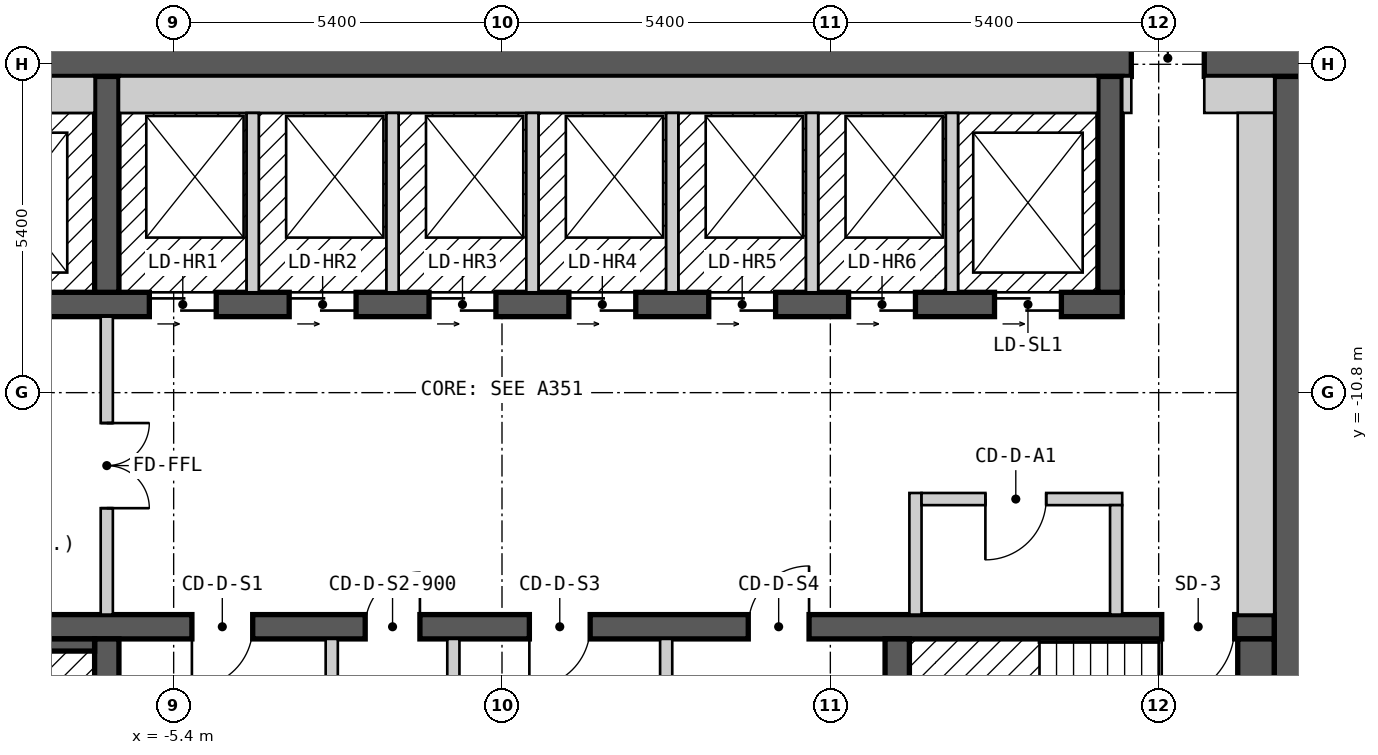
"""IFC4 building model, lengths in metres.
Left out: names, types, materials, properties, quantities, classifications, styles, units other than length and angle.
Written with IfcOpenShell. Run it as: python <this file> out.ifc"""

import sys

from ifc_helpers import new_model, si_unit, direction, frame, frame_2d, origin, place, context, subcontext, project, spatial, rectangle, extrude, element, fill, save


model = new_model("IFC4")
c1 = context("Model", 3, precision=1e-05, world=origin(), true_north=direction((0.0, 1.0)))
c2 = subcontext(c1, "Body", "Model", "MODEL_VIEW")
j1 = project(units=[si_unit("LENGTHUNIT", "METRE"), si_unit("PLANEANGLEUNIT", "RADIAN")], contexts=[c1])
p1 = place(None, origin())
s1 = spatial("IfcSite", under=j1, at=p1, CompositionType="ELEMENT")
p2 = place(p1, origin())
s2 = spatial("IfcBuilding", under=s1, at=p2, CompositionType="ELEMENT")
p3 = place(p2, frame((0.0, 0.0, 187.2)))
s3 = spatial("IfcBuildingStorey", under=s2, at=p3, CompositionType="ELEMENT", Elevation=187.2)
p4 = place(p3, frame((-13.3, -5.3, 0.0), z_axis=(0.0, 0.0, 1.0), x_axis=(1.0, 0.0, 0.0)))
e1 = element("IfcWall", 1, at=p4, inside=s3, PredefinedType="SHEAR", context=c2, shape_type="SweptSolid", body=[
    extrude(rectangle(XDim=26.6, YDim=0.6, at=frame_2d((13.3, 0.0))), origin(), (0.0, 0.0, 1.0), 2.7),
])
p5 = place(p4, frame((23.65, 0.0, 0.0)))
e2 = element("IfcOpeningElement", 2, at=p5, cuts=e1, PredefinedType="OPENING", context=c2, shape_type="SweptSolid", body=[
    extrude(rectangle(XDim=1.2, YDim=2.1, at=frame_2d((0.6, 1.05))), frame((0.0, 0.31, 0.0), z_axis=(0.0, -1.0, 0.0), x_axis=(1.0, 0.0, 0.0)), (0.0, 0.0, 1.0), 0.62),
])
p6 = place(p3, frame((13.0, -18.4, 0.0), z_axis=(0.0, 0.0, 1.0), x_axis=(0.0, 1.0, 0.0)))
e3 = element("IfcWall", 3, at=p6, inside=s3, PredefinedType="SHEAR", context=c2, shape_type="SweptSolid", body=[
    extrude(rectangle(XDim=12.8, YDim=0.6, at=frame_2d((6.4, 0.0))), origin(), (0.0, 0.0, 1.0), 2.7),
])
p7 = place(p3, frame((-12.7, -14.65, 0.0), z_axis=(0.0, 0.0, 1.0), x_axis=(1.0, 0.0, 0.0)))
e4 = element("IfcWall", 4, at=p7, inside=s3, PredefinedType="SHEAR", context=c2, shape_type="SweptSolid", body=[
    extrude(rectangle(XDim=25.4, YDim=0.4, at=frame_2d((12.7, 0.0))), origin(), (0.0, 0.0, 1.0), 2.7),
])
p8 = place(p7, frame((1.9, 0.0, 0.0), z_axis=(0.0, 0.0, 1.0), x_axis=(-1.0, 0.0, 0.0)))
e5 = element("IfcOpeningElement", 5, at=p8, cuts=e4, PredefinedType="OPENING", context=c2, shape_type="SweptSolid", body=[
    extrude(rectangle(XDim=1.2, YDim=2.1, at=frame_2d((0.6, 1.05))), frame((0.0, 0.21, 0.0), z_axis=(0.0, -1.0, 0.0), x_axis=(1.0, 0.0, 0.0)), (0.0, 0.0, 1.0), 0.42),
])
p9 = place(p7, frame((24.75, 0.0, 0.0), z_axis=(0.0, 0.0, 1.0), x_axis=(-1.0, 0.0, 0.0)))
e6 = element("IfcOpeningElement", 6, at=p9, cuts=e4, PredefinedType="OPENING", context=c2, shape_type="SweptSolid", body=[
    extrude(rectangle(XDim=1.2, YDim=2.1, at=frame_2d((0.6, 1.05))), frame((0.0, 0.21, 0.0), z_axis=(0.0, -1.0, 0.0), x_axis=(1.0, 0.0, 0.0)), (0.0, 0.0, 1.0), 0.42),
])
p10 = place(p7, frame((8.6, 0.0, 0.0), z_axis=(0.0, 0.0, 1.0), x_axis=(-1.0, 0.0, 0.0)))
e7 = element("IfcOpeningElement", 7, at=p10, cuts=e4, PredefinedType="OPENING", context=c2, shape_type="SweptSolid", body=[
    extrude(rectangle(XDim=1.0, YDim=2.1, at=frame_2d((0.5, 1.05))), frame((0.0, 0.21, 0.0), z_axis=(0.0, -1.0, 0.0), x_axis=(1.0, 0.0, 0.0)), (0.0, 0.0, 1.0), 0.42),
])
p11 = place(p7, frame((11.35, 0.0, 0.0), z_axis=(0.0, 0.0, 1.0), x_axis=(-1.0, 0.0, 0.0)))
e8 = element("IfcOpeningElement", 8, at=p11, cuts=e4, PredefinedType="OPENING", context=c2, shape_type="SweptSolid", body=[
    extrude(rectangle(XDim=0.9, YDim=2.1, at=frame_2d((0.45, 1.05))), frame((0.0, 0.21, 0.0), z_axis=(0.0, -1.0, 0.0), x_axis=(1.0, 0.0, 0.0)), (0.0, 0.0, 1.0), 0.42),
])
p12 = place(p7, frame((14.15, 0.0, 0.0), z_axis=(0.0, 0.0, 1.0), x_axis=(-1.0, 0.0, 0.0)))
e9 = element("IfcOpeningElement", 9, at=p12, cuts=e4, PredefinedType="OPENING", context=c2, shape_type="SweptSolid", body=[
    extrude(rectangle(XDim=1.0, YDim=2.1, at=frame_2d((0.5, 1.05))), frame((0.0, 0.21, 0.0), z_axis=(0.0, -1.0, 0.0), x_axis=(1.0, 0.0, 0.0)), (0.0, 0.0, 1.0), 0.42),
])
p13 = place(p7, frame((17.75, 0.0, 0.0), z_axis=(0.0, 0.0, 1.0), x_axis=(-1.0, 0.0, 0.0)))
e10 = element("IfcOpeningElement", 10, at=p13, cuts=e4, PredefinedType="OPENING", context=c2, shape_type="SweptSolid", body=[
    extrude(rectangle(XDim=1.0, YDim=2.1, at=frame_2d((0.5, 1.05))), frame((0.0, 0.21, 0.0), z_axis=(0.0, -1.0, 0.0), x_axis=(1.0, 0.0, 0.0)), (0.0, 0.0, 1.0), 0.42),
])
p14 = place(p3, frame((-12.7, -9.35, 0.0), z_axis=(0.0, 0.0, 1.0), x_axis=(1.0, 0.0, 0.0)))
e11 = element("IfcWall", 11, at=p14, inside=s3, PredefinedType="SHEAR", context=c2, shape_type="SweptSolid", body=[
    extrude(rectangle(XDim=22.9, YDim=0.4, at=frame_2d((11.45, 0.0))), origin(), (0.0, 0.0, 1.0), 2.7),
])
p15 = place(p14, frame((1.3, 0.0, 0.0)))
e12 = element("IfcOpeningElement", 12, at=p15, cuts=e11, PredefinedType="OPENING", context=c2, shape_type="SweptSolid", body=[
    extrude(rectangle(XDim=1.1, YDim=2.1, at=frame_2d((0.55, 1.05))), frame((0.0, 0.21, 0.0), z_axis=(0.0, -1.0, 0.0), x_axis=(1.0, 0.0, 0.0)), (0.0, 0.0, 1.0), 0.42),
])
p16 = place(p14, frame((4.1, 0.0, 0.0)))
e13 = element("IfcOpeningElement", 13, at=p16, cuts=e11, PredefinedType="OPENING", context=c2, shape_type="SweptSolid", body=[
    extrude(rectangle(XDim=1.1, YDim=2.1, at=frame_2d((0.55, 1.05))), frame((0.0, 0.21, 0.0), z_axis=(0.0, -1.0, 0.0), x_axis=(1.0, 0.0, 0.0)), (0.0, 0.0, 1.0), 0.42),
])
p17 = place(p14, frame((6.9, 0.0, 0.0)))
e14 = element("IfcOpeningElement", 14, at=p17, cuts=e11, PredefinedType="OPENING", context=c2, shape_type="SweptSolid", body=[
    extrude(rectangle(XDim=1.1, YDim=2.1, at=frame_2d((0.55, 1.05))), frame((0.0, 0.21, 0.0), z_axis=(0.0, -1.0, 0.0), x_axis=(1.0, 0.0, 0.0)), (0.0, 0.0, 1.0), 0.42),
])
p18 = place(p14, frame((9.2, 0.0, 0.0)))
e15 = element("IfcOpeningElement", 15, at=p18, cuts=e11, PredefinedType="OPENING", context=c2, shape_type="SweptSolid", body=[
    extrude(rectangle(XDim=1.1, YDim=2.1, at=frame_2d((0.55, 1.05))), frame((0.0, 0.21, 0.0), z_axis=(0.0, -1.0, 0.0), x_axis=(1.0, 0.0, 0.0)), (0.0, 0.0, 1.0), 0.42),
])
p19 = place(p14, frame((11.5, 0.0, 0.0)))
e16 = element("IfcOpeningElement", 16, at=p19, cuts=e11, PredefinedType="OPENING", context=c2, shape_type="SweptSolid", body=[
    extrude(rectangle(XDim=1.1, YDim=2.1, at=frame_2d((0.55, 1.05))), frame((0.0, 0.21, 0.0), z_axis=(0.0, -1.0, 0.0), x_axis=(1.0, 0.0, 0.0)), (0.0, 0.0, 1.0), 0.42),
])
p20 = place(p14, frame((13.8, 0.0, 0.0)))
e17 = element("IfcOpeningElement", 17, at=p20, cuts=e11, PredefinedType="OPENING", context=c2, shape_type="SweptSolid", body=[
    extrude(rectangle(XDim=1.1, YDim=2.1, at=frame_2d((0.55, 1.05))), frame((0.0, 0.21, 0.0), z_axis=(0.0, -1.0, 0.0), x_axis=(1.0, 0.0, 0.0)), (0.0, 0.0, 1.0), 0.42),
])
p21 = place(p14, frame((16.1, 0.0, 0.0)))
e18 = element("IfcOpeningElement", 18, at=p21, cuts=e11, PredefinedType="OPENING", context=c2, shape_type="SweptSolid", body=[
    extrude(rectangle(XDim=1.1, YDim=2.1, at=frame_2d((0.55, 1.05))), frame((0.0, 0.21, 0.0), z_axis=(0.0, -1.0, 0.0), x_axis=(1.0, 0.0, 0.0)), (0.0, 0.0, 1.0), 0.42),
])
p22 = place(p14, frame((18.4, 0.0, 0.0)))
e19 = element("IfcOpeningElement", 19, at=p22, cuts=e11, PredefinedType="OPENING", context=c2, shape_type="SweptSolid", body=[
    extrude(rectangle(XDim=1.1, YDim=2.1, at=frame_2d((0.55, 1.05))), frame((0.0, 0.21, 0.0), z_axis=(0.0, -1.0, 0.0), x_axis=(1.0, 0.0, 0.0)), (0.0, 0.0, 1.0), 0.42),
])
p23 = place(p14, frame((20.8, 0.0, 0.0)))
e20 = element("IfcOpeningElement", 20, at=p23, cuts=e11, PredefinedType="OPENING", context=c2, shape_type="SweptSolid", body=[
    extrude(rectangle(XDim=1.1, YDim=2.1, at=frame_2d((0.55, 1.05))), frame((0.0, 0.21, 0.0), z_axis=(0.0, -1.0, 0.0), x_axis=(1.0, 0.0, 0.0)), (0.0, 0.0, 1.0), 0.42),
])
for number, where, z_axis, x_axis in (
    (21, (-6.5, -18.4, 0.0), (0.0, 0.0, 1.0), (0.0, 1.0, 0.0)),
    (22, (6.5, -18.4, 0.0), (0.0, 0.0, 1.0), (0.0, 1.0, 0.0)),
    (23, (-6.5, -9.15, 0.0), (0.0, 0.0, 1.0), (0.0, 1.0, 0.0)),
    (24, (10.0, -9.15, 0.0), (0.0, 0.0, 1.0), (0.0, 1.0, 0.0)),
):
    element("IfcWall", number, at=place(p3, frame(where, z_axis=z_axis, x_axis=x_axis)), inside=s3, PredefinedType="SHEAR", context=c2, shape_type="SweptSolid", body=[
        extrude(rectangle(XDim=3.55, YDim=0.4, at=frame_2d((1.775, 0.0))), origin(), (0.0, 0.0, 1.0), 2.7),
    ])
p24 = place(p3, frame((-12.1, -5.9, 0.0), z_axis=(0.0, 0.0, 1.0), x_axis=(1.0, 0.0, 0.0)))
e25 = element("IfcWall", 25, at=p24, inside=s3, PredefinedType="SOLIDWALL", context=c2, shape_type="SweptSolid", body=[
    extrude(rectangle(XDim=5.4, YDim=0.6, at=frame_2d((2.7, 0.0))), origin(), (0.0, 0.0, 1.0), 2.7),
])
p25 = place(p3, frame((-10.8, -14.95, 0.0), z_axis=(0.0, 0.0, 1.0), x_axis=(1.0, 0.0, 0.0)))
e26 = element("IfcWall", 26, at=p25, inside=s3, PredefinedType="SOLIDWALL", context=c2, shape_type="SweptSolid", body=[
    extrude(rectangle(XDim=4.1, YDim=0.2, at=frame_2d((2.05, 0.0))), origin(), (0.0, 0.0, 1.0), 2.7),
])
p26 = place(p3, frame((-6.5, -14.45, 0.0), z_axis=(0.0, 0.0, 1.0), x_axis=(0.0, 1.0, 0.0)))
e27 = element("IfcWall", 27, at=p26, inside=s3, PredefinedType="PARTITIONING", context=c2, shape_type="SweptSolid", body=[
    extrude(rectangle(XDim=4.9, YDim=0.2, at=frame_2d((2.45, 0.0))), origin(), (0.0, 0.0, 1.0), 2.7),
])
p27 = place(p26, frame((3.15, 0.0, 0.0), z_axis=(0.0, 0.0, 1.0), x_axis=(-1.0, 0.0, 0.0)))
e28 = element("IfcOpeningElement", 28, at=p27, cuts=e27, PredefinedType="OPENING", context=c2, shape_type="SweptSolid", body=[
    extrude(rectangle(XDim=1.4, YDim=2.1, at=frame_2d((0.7, 1.05))), frame((0.0, 0.11, 0.0), z_axis=(0.0, -1.0, 0.0), x_axis=(1.0, 0.0, 0.0)), (0.0, 0.0, 1.0), 0.22),
])
p28 = place(p3, frame((-6.3, -5.9, 0.0), z_axis=(0.0, 0.0, 1.0), x_axis=(1.0, 0.0, 0.0)))
e29 = element("IfcWall", 29, at=p28, inside=s3, PredefinedType="SOLIDWALL", context=c2, shape_type="SweptSolid", body=[
    extrude(rectangle(XDim=16.1, YDim=0.6, at=frame_2d((8.05, 0.0))), origin(), (0.0, 0.0, 1.0), 2.7),
])
p29 = place(p3, frame((-4.1, -9.15, 0.0), z_axis=(0.0, 0.0, 1.0), x_axis=(0.0, 1.0, 0.0)))
e30 = element("IfcWall", 30, at=p29, inside=s3, PredefinedType="SOLIDWALL", context=c2, shape_type="SweptSolid", body=[
    extrude(rectangle(XDim=2.95, YDim=0.2, at=frame_2d((1.475, 0.0))), origin(), (0.0, 0.0, 1.0), 2.7),
])
p30 = place(p3, frame((-2.8, -17.8, 0.0), z_axis=(0.0, 0.0, 1.0), x_axis=(0.0, 1.0, 0.0)))
e31 = element("IfcWall", 31, at=p30, inside=s3, PredefinedType="PARTITIONING", context=c2, shape_type="SweptSolid", body=[
    extrude(rectangle(XDim=2.95, YDim=0.2, at=frame_2d((1.475, 0.0))), origin(), (0.0, 0.0, 1.0), 2.7),
])
p31 = place(p3, frame((-1.8, -9.15, 0.0), z_axis=(0.0, 0.0, 1.0), x_axis=(0.0, 1.0, 0.0)))
e32 = element("IfcWall", 32, at=p31, inside=s3, PredefinedType="SOLIDWALL", context=c2, shape_type="SweptSolid", body=[
    extrude(rectangle(XDim=2.95, YDim=0.2, at=frame_2d((1.475, 0.0))), origin(), (0.0, 0.0, 1.0), 2.7),
])
p32 = place(p3, frame((-0.8, -17.8, 0.0), z_axis=(0.0, 0.0, 1.0), x_axis=(0.0, 1.0, 0.0)))
e33 = element("IfcWall", 33, at=p32, inside=s3, PredefinedType="PARTITIONING", context=c2, shape_type="SweptSolid", body=[
    extrude(rectangle(XDim=2.95, YDim=0.2, at=frame_2d((1.475, 0.0))), origin(), (0.0, 0.0, 1.0), 2.7),
])
p33 = place(p3, frame((0.5, -9.15, 0.0), z_axis=(0.0, 0.0, 1.0), x_axis=(0.0, 1.0, 0.0)))
e34 = element("IfcWall", 34, at=p33, inside=s3, PredefinedType="SOLIDWALL", context=c2, shape_type="SweptSolid", body=[
    extrude(rectangle(XDim=2.95, YDim=0.2, at=frame_2d((1.475, 0.0))), origin(), (0.0, 0.0, 1.0), 2.7),
])
p34 = place(p3, frame((2.7, -17.8, 0.0), z_axis=(0.0, 0.0, 1.0), x_axis=(0.0, 1.0, 0.0)))
e35 = element("IfcWall", 35, at=p34, inside=s3, PredefinedType="PARTITIONING", context=c2, shape_type="SweptSolid", body=[
    extrude(rectangle(XDim=2.95, YDim=0.2, at=frame_2d((1.475, 0.0))), origin(), (0.0, 0.0, 1.0), 2.7),
])
for number, where, z_axis, x_axis in (
    (36, (2.8, -9.15, 0.0), (0.0, 0.0, 1.0), (0.0, 1.0, 0.0)),
    (37, (5.1, -9.15, 0.0), (0.0, 0.0, 1.0), (0.0, 1.0, 0.0)),
):
    element("IfcWall", number, at=place(p3, frame(where, z_axis=z_axis, x_axis=x_axis)), inside=s3, PredefinedType="SOLIDWALL", context=c2, shape_type="SweptSolid", body=[
        extrude(rectangle(XDim=2.95, YDim=0.2, at=frame_2d((1.475, 0.0))), origin(), (0.0, 0.0, 1.0), 2.7),
    ])
p35 = place(p3, frame((6.8, -14.45, 0.0), z_axis=(0.0, 0.0, 1.0), x_axis=(0.0, 1.0, 0.0)))
e38 = element("IfcWall", 38, at=p35, inside=s3, PredefinedType="PARTITIONING", context=c2, shape_type="SweptSolid", body=[
    extrude(rectangle(XDim=2.0, YDim=0.2, at=frame_2d((1.0, 0.0))), origin(), (0.0, 0.0, 1.0), 2.7),
])
p36 = place(p3, frame((6.9, -12.55, 0.0), z_axis=(0.0, 0.0, 1.0), x_axis=(1.0, 0.0, 0.0)))
e39 = element("IfcWall", 39, at=p36, inside=s3, PredefinedType="PARTITIONING", context=c2, shape_type="SweptSolid", body=[
    extrude(rectangle(XDim=3.3, YDim=0.2, at=frame_2d((1.65, 0.0))), origin(), (0.0, 0.0, 1.0), 2.7),
])
p37 = place(p36, frame((2.05, 0.0, 0.0), z_axis=(0.0, 0.0, 1.0), x_axis=(-1.0, 0.0, 0.0)))
e40 = element("IfcOpeningElement", 40, at=p37, cuts=e39, PredefinedType="OPENING", context=c2, shape_type="SweptSolid", body=[
    extrude(rectangle(XDim=1.0, YDim=2.1, at=frame_2d((0.5, 1.05))), frame((0.0, 0.11, 0.0), z_axis=(0.0, -1.0, 0.0), x_axis=(1.0, 0.0, 0.0)), (0.0, 0.0, 1.0), 0.22),
])
p38 = place(p3, frame((7.4, -9.15, 0.0), z_axis=(0.0, 0.0, 1.0), x_axis=(0.0, 1.0, 0.0)))
e41 = element("IfcWall", 41, at=p38, inside=s3, PredefinedType="SOLIDWALL", context=c2, shape_type="SweptSolid", body=[
    extrude(rectangle(XDim=2.95, YDim=0.2, at=frame_2d((1.475, 0.0))), origin(), (0.0, 0.0, 1.0), 2.7),
])
p39 = place(p3, frame((10.1, -14.45, 0.0), z_axis=(0.0, 0.0, 1.0), x_axis=(0.0, 1.0, 0.0)))
e42 = element("IfcWall", 42, at=p39, inside=s3, PredefinedType="PARTITIONING", context=c2, shape_type="SweptSolid", body=[
    extrude(rectangle(XDim=1.8, YDim=0.2, at=frame_2d((0.9, 0.0))), origin(), (0.0, 0.0, 1.0), 2.7),
])
p40 = place(p3, frame((10.275, -6.2, 0.0), z_axis=(0.0, 0.0, 1.0), x_axis=(0.0, 1.0, 0.0)))
e43 = element("IfcWall", 43, at=p40, inside=s3, PredefinedType="PARTITIONING", context=c2, shape_type="SweptSolid", body=[
    extrude(rectangle(XDim=0.6, YDim=0.15, at=frame_2d((0.3, 0.0))), origin(), (0.0, 0.0, 1.0), 2.7),
])
p41 = place(p3, frame((11.55, -5.9, 0.0), z_axis=(0.0, 0.0, 1.0), x_axis=(1.0, 0.0, 0.0)))
e44 = element("IfcWall", 44, at=p41, inside=s3, PredefinedType="PARTITIONING", context=c2, shape_type="SweptSolid", body=[
    extrude(rectangle(XDim=1.15, YDim=0.6, at=frame_2d((0.575, 0.0))), origin(), (0.0, 0.0, 1.0), 2.7),
])
p42 = place(p3, frame((12.4, -17.6, 0.0), z_axis=(0.0, 0.0, 1.0), x_axis=(0.0, 1.0, 0.0)))
e45 = element("IfcWall", 45, at=p42, inside=s3, PredefinedType="SOLIDWALL", context=c2, shape_type="SweptSolid", body=[
    extrude(rectangle(XDim=2.75, YDim=0.6, at=frame_2d((1.375, 0.0))), origin(), (0.0, 0.0, 1.0), 2.7),
])
p43 = place(p3, frame((12.4, -14.45, 0.0), z_axis=(0.0, 0.0, 1.0), x_axis=(0.0, 1.0, 0.0)))
e46 = element("IfcWall", 46, at=p43, inside=s3, PredefinedType="PARTITIONING", context=c2, shape_type="SweptSolid", body=[
    extrude(rectangle(XDim=8.25, YDim=0.6, at=frame_2d((4.125, 0.0))), origin(), (0.0, 0.0, 1.0), 2.7),
])
p44 = place(p17, origin())
e47 = element("IfcDoor", 47, at=p44, inside=s3, OperationType="DOUBLE_DOOR_SLIDING", PredefinedType="DOOR", context=c2, shape_type="SweptSolid", body=[
    extrude(rectangle(XDim=1.1, YDim=2.1, at=frame_2d((0.55, 1.05))), frame((0.0, 0.025, 0.0), z_axis=(0.0, -1.0, 0.0), x_axis=(1.0, 0.0, 0.0)), (0.0, 0.0, 1.0), 0.05),
])
fill(e14, e47)
p45 = place(p18, origin())
e48 = element("IfcDoor", 48, at=p45, inside=s3, OperationType="DOUBLE_DOOR_SLIDING", PredefinedType="DOOR", context=c2, shape_type="SweptSolid", body=[
    extrude(rectangle(XDim=1.1, YDim=2.1, at=frame_2d((0.55, 1.05))), frame((0.0, 0.025, 0.0), z_axis=(0.0, -1.0, 0.0), x_axis=(1.0, 0.0, 0.0)), (0.0, 0.0, 1.0), 0.05),
])
fill(e15, e48)
p46 = place(p19, origin())
e49 = element("IfcDoor", 49, at=p46, inside=s3, OperationType="DOUBLE_DOOR_SLIDING", PredefinedType="DOOR", context=c2, shape_type="SweptSolid", body=[
    extrude(rectangle(XDim=1.1, YDim=2.1, at=frame_2d((0.55, 1.05))), frame((0.0, 0.025, 0.0), z_axis=(0.0, -1.0, 0.0), x_axis=(1.0, 0.0, 0.0)), (0.0, 0.0, 1.0), 0.05),
])
fill(e16, e49)
p47 = place(p20, origin())
e50 = element("IfcDoor", 50, at=p47, inside=s3, OperationType="DOUBLE_DOOR_SLIDING", PredefinedType="DOOR", context=c2, shape_type="SweptSolid", body=[
    extrude(rectangle(XDim=1.1, YDim=2.1, at=frame_2d((0.55, 1.05))), frame((0.0, 0.025, 0.0), z_axis=(0.0, -1.0, 0.0), x_axis=(1.0, 0.0, 0.0)), (0.0, 0.0, 1.0), 0.05),
])
fill(e17, e50)
p48 = place(p21, origin())
e51 = element("IfcDoor", 51, at=p48, inside=s3, OperationType="DOUBLE_DOOR_SLIDING", PredefinedType="DOOR", context=c2, shape_type="SweptSolid", body=[
    extrude(rectangle(XDim=1.1, YDim=2.1, at=frame_2d((0.55, 1.05))), frame((0.0, 0.025, 0.0), z_axis=(0.0, -1.0, 0.0), x_axis=(1.0, 0.0, 0.0)), (0.0, 0.0, 1.0), 0.05),
])
fill(e18, e51)
p49 = place(p22, origin())
e52 = element("IfcDoor", 52, at=p49, inside=s3, OperationType="DOUBLE_DOOR_SLIDING", PredefinedType="DOOR", context=c2, shape_type="SweptSolid", body=[
    extrude(rectangle(XDim=1.1, YDim=2.1, at=frame_2d((0.55, 1.05))), frame((0.0, 0.025, 0.0), z_axis=(0.0, -1.0, 0.0), x_axis=(1.0, 0.0, 0.0)), (0.0, 0.0, 1.0), 0.05),
])
fill(e19, e52)
p50 = place(p23, origin())
e53 = element("IfcDoor", 53, at=p50, inside=s3, OperationType="DOUBLE_DOOR_SLIDING", PredefinedType="DOOR", context=c2, shape_type="SweptSolid", body=[
    extrude(rectangle(XDim=1.1, YDim=2.1, at=frame_2d((0.55, 1.05))), frame((0.0, 0.025, 0.0), z_axis=(0.0, -1.0, 0.0), x_axis=(1.0, 0.0, 0.0)), (0.0, 0.0, 1.0), 0.05),
])
fill(e20, e53)
p51 = place(p9, origin())
e54 = element("IfcDoor", 54, at=p51, inside=s3, OperationType="SINGLE_SWING_RIGHT", PredefinedType="DOOR", context=c2, shape_type="SweptSolid", body=[
    extrude(rectangle(XDim=1.2, YDim=2.1, at=frame_2d((0.6, 1.05))), frame((0.0, 0.025, 0.0), z_axis=(0.0, -1.0, 0.0), x_axis=(1.0, 0.0, 0.0)), (0.0, 0.0, 1.0), 0.05),
])
fill(e6, e54)
p52 = place(p27, origin())
e55 = element("IfcDoor", 55, at=p52, inside=s3, OperationType="DOUBLE_DOOR_SINGLE_SWING", PredefinedType="DOOR", context=c2, shape_type="SweptSolid", body=[
    extrude(rectangle(XDim=1.4, YDim=2.1, at=frame_2d((0.7, 1.05))), frame((0.0, 0.025, 0.0), z_axis=(0.0, -1.0, 0.0), x_axis=(1.0, 0.0, 0.0)), (0.0, 0.0, 1.0), 0.05),
])
fill(e28, e55)
p53 = place(p5, origin())
e56 = element("IfcDoor", 56, at=p53, inside=s3, OperationType="DOUBLE_DOOR_SINGLE_SWING", PredefinedType="DOOR", context=c2, shape_type="SweptSolid", body=[
    extrude(rectangle(XDim=1.2, YDim=2.1, at=frame_2d((0.6, 1.05))), frame((0.0, 0.025, 0.0), z_axis=(0.0, -1.0, 0.0), x_axis=(1.0, 0.0, 0.0)), (0.0, 0.0, 1.0), 0.05),
])
fill(e2, e56)
p54 = place(p37, origin())
e57 = element("IfcDoor", 57, at=p54, inside=s3, OperationType="SINGLE_SWING_RIGHT", PredefinedType="DOOR", context=c2, shape_type="SweptSolid", body=[
    extrude(rectangle(XDim=1.0, YDim=2.1, at=frame_2d((0.5, 1.05))), frame((0.0, 0.025, 0.0), z_axis=(0.0, -1.0, 0.0), x_axis=(1.0, 0.0, 0.0)), (0.0, 0.0, 1.0), 0.05),
])
fill(e40, e57)
p55 = place(p10, origin())
e58 = element("IfcDoor", 58, at=p55, inside=s3, OperationType="SINGLE_SWING_RIGHT", PredefinedType="DOOR", context=c2, shape_type="SweptSolid", body=[
    extrude(rectangle(XDim=1.0, YDim=2.1, at=frame_2d((0.5, 1.05))), frame((0.0, 0.025, 0.0), z_axis=(0.0, -1.0, 0.0), x_axis=(1.0, 0.0, 0.0)), (0.0, 0.0, 1.0), 0.05),
])
fill(e7, e58)
p56 = place(p11, origin())
e59 = element("IfcDoor", 59, at=p56, inside=s3, OperationType="SINGLE_SWING_LEFT", PredefinedType="DOOR", context=c2, shape_type="SweptSolid", body=[
    extrude(rectangle(XDim=0.9, YDim=2.1, at=frame_2d((0.45, 1.05))), frame((0.0, 0.025, 0.0), z_axis=(0.0, -1.0, 0.0), x_axis=(1.0, 0.0, 0.0)), (0.0, 0.0, 1.0), 0.05),
])
fill(e8, e59)
p57 = place(p12, origin())
e60 = element("IfcDoor", 60, at=p57, inside=s3, OperationType="SINGLE_SWING_RIGHT", PredefinedType="DOOR", context=c2, shape_type="SweptSolid", body=[
    extrude(rectangle(XDim=1.0, YDim=2.1, at=frame_2d((0.5, 1.05))), frame((0.0, 0.025, 0.0), z_axis=(0.0, -1.0, 0.0), x_axis=(1.0, 0.0, 0.0)), (0.0, 0.0, 1.0), 0.05),
])
fill(e9, e60)
p58 = place(p13, origin())
e61 = element("IfcDoor", 61, at=p58, inside=s3, OperationType="SINGLE_SWING_LEFT", PredefinedType="DOOR", context=c2, shape_type="SweptSolid", body=[
    extrude(rectangle(XDim=1.0, YDim=2.1, at=frame_2d((0.5, 1.05))), frame((0.0, 0.025, 0.0), z_axis=(0.0, -1.0, 0.0), x_axis=(1.0, 0.0, 0.0)), (0.0, 0.0, 1.0), 0.05),
])
fill(e10, e61)
save(model, sys.argv[1])
